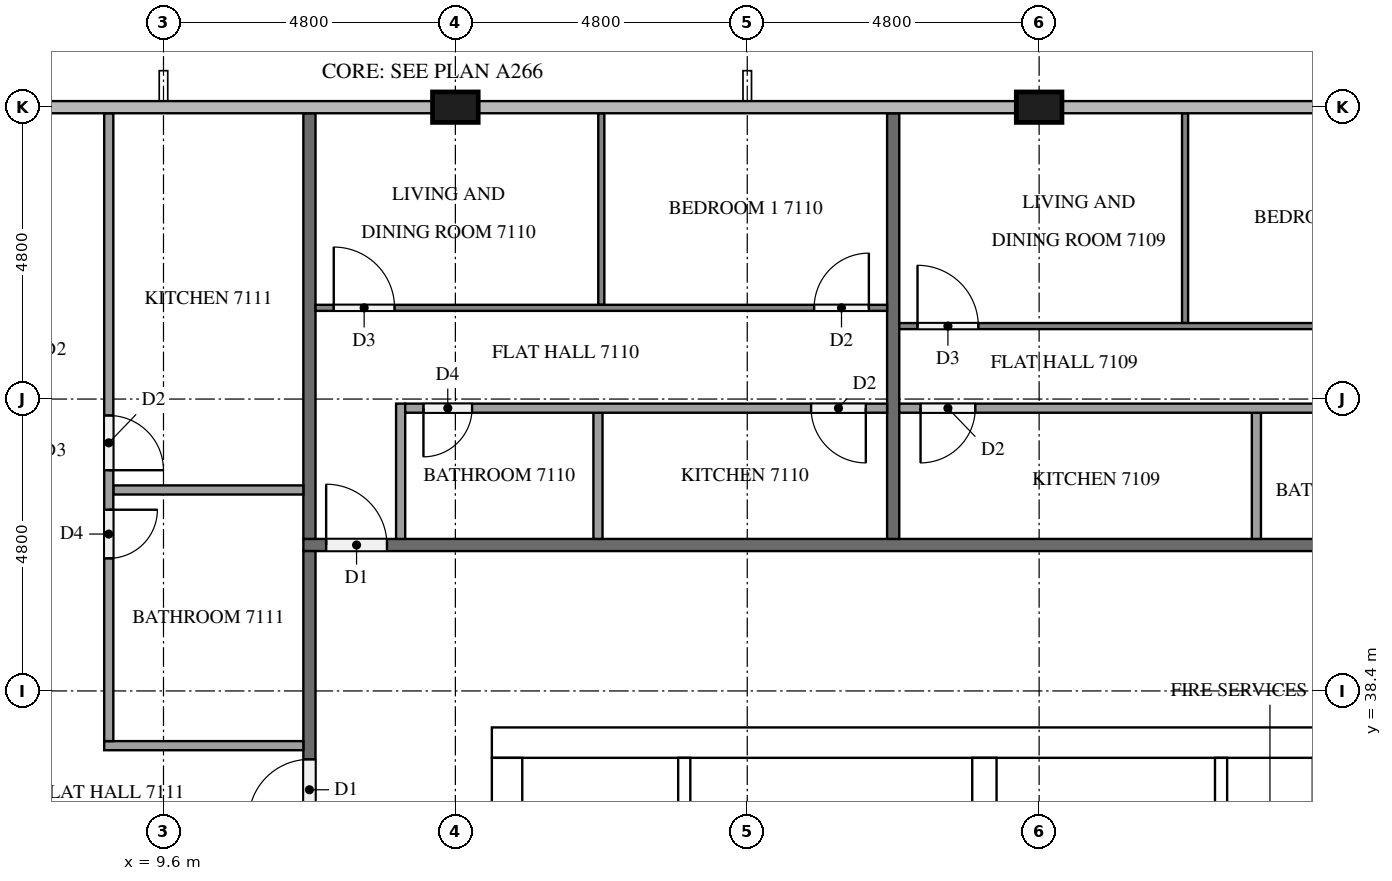
"""IFC4 building model, lengths in metres.
Left out: names, types, materials, properties, quantities, classifications, styles, units other than length and angle.
Written with IfcOpenShell. Run it as: python <this file> out.ifc"""

import sys

from ifc_helpers import new_model, si_unit, direction, frame, frame_2d, origin, origin_2d, place, context, subcontext, project, spatial, rectangle, extrude, element, fill, save


model = new_model("IFC4")
c1 = context("Model", 3, precision=1e-05, world=origin(), true_north=direction((0.0, 1.0)))
c2 = subcontext(c1, "Body", "Model", "MODEL_VIEW")
j1 = project(units=[si_unit("LENGTHUNIT", "METRE"), si_unit("PLANEANGLEUNIT", "RADIAN")], contexts=[c1])
p1 = place(None, origin())
s1 = spatial("IfcSite", under=j1, at=p1, CompositionType="ELEMENT")
p2 = place(p1, origin())
s2 = spatial("IfcBuilding", under=s1, at=p2, CompositionType="ELEMENT")
p3 = place(p2, frame((0.0, 0.0, 272.1)))
s3 = spatial("IfcBuildingStorey", under=s2, at=p3, CompositionType="ELEMENT", Elevation=272.1)
p4 = place(p3, frame((15.0, 37.55, 0.0), z_axis=(0.0, 0.0, 1.0), x_axis=(1.0, 0.0, 0.0)))
e1 = element("IfcWall", 1, at=p4, inside=s3, PredefinedType="SHEAR", context=c2, shape_type="SweptSolid", body=[
    extrude(rectangle(XDim=32.4, YDim=0.5, at=frame_2d((16.2, 0.0))), origin(), (0.0, 0.0, 1.0), 3.2),
])
p5 = place(p4, frame((15.3, 0.0, 0.0)))
e2 = element("IfcOpeningElement", 2, at=p5, cuts=e1, PredefinedType="OPENING", context=c2, shape_type="SweptSolid", body=[
    extrude(rectangle(XDim=1.8, YDim=2.1, at=frame_2d((0.9, 1.05))), frame((0.0, 0.26, 0.0), z_axis=(0.0, -1.0, 0.0), x_axis=(1.0, 0.0, 0.0)), (0.0, 0.0, 1.0), 0.52),
])
p6 = place(p4, frame((1.282, 0.0, 0.0)))
e3 = element("IfcOpeningElement", 3, at=p6, cuts=e1, PredefinedType="OPENING", context=c2, shape_type="SweptSolid", body=[
    extrude(rectangle(XDim=1.0, YDim=2.1, at=frame_2d((0.5, 1.05))), frame((0.0, 0.26, 0.0), z_axis=(0.0, -1.0, 0.0), x_axis=(1.0, 0.0, 0.0)), (0.0, 0.0, 1.0), 0.52),
])
p7 = place(p4, frame((5.082, 0.0, 0.0)))
e4 = element("IfcOpeningElement", 4, at=p7, cuts=e1, PredefinedType="OPENING", context=c2, shape_type="SweptSolid", body=[
    extrude(rectangle(XDim=1.0, YDim=2.1, at=frame_2d((0.5, 1.05))), frame((0.0, 0.26, 0.0), z_axis=(0.0, -1.0, 0.0), x_axis=(1.0, 0.0, 0.0)), (0.0, 0.0, 1.0), 0.52),
])
p8 = place(p3, frame((15.25, 15.5, 0.0), z_axis=(0.0, 0.0, 1.0), x_axis=(0.0, 1.0, 0.0)))
e5 = element("IfcWall", 5, at=p8, inside=s3, PredefinedType="SHEAR", context=c2, shape_type="SweptSolid", body=[
    extrude(rectangle(XDim=21.8, YDim=0.5, at=frame_2d((10.9, 0.0))), origin(), (0.0, 0.0, 1.0), 3.2),
])
p9 = place(p8, frame((5.26, 0.0, 0.0)))
e6 = element("IfcOpeningElement", 6, at=p9, cuts=e5, PredefinedType="OPENING", context=c2, shape_type="SweptSolid", body=[
    extrude(rectangle(XDim=1.2, YDim=2.1, at=frame_2d((0.6, 1.05))), frame((0.0, 0.26, 0.0), z_axis=(0.0, -1.0, 0.0), x_axis=(1.0, 0.0, 0.0)), (0.0, 0.0, 1.0), 0.52),
])
p10 = place(p3, frame((23.1, 15.5, 0.0), z_axis=(0.0, 0.0, 1.0), x_axis=(0.0, 1.0, 0.0)))
e7 = element("IfcWall", 7, at=p10, inside=s3, PredefinedType="SHEAR", context=c2, shape_type="SweptSolid", body=[
    extrude(rectangle(XDim=21.8, YDim=0.4, at=frame_2d((10.9, 0.0))), origin(), (0.0, 0.0, 1.0), 3.2),
])
for number, where, z_axis, x_axis in (
    (8, (24.0, 48.0, 0.0), (0.0, 0.0, 1.0), (1.0, 0.0, 0.0)),
    (9, (14.4, 48.0, 0.0), (0.0, 0.0, 1.0), (1.0, 0.0, 0.0)),
):
    element("IfcColumn", number, at=place(p3, frame(where, z_axis=z_axis, x_axis=x_axis)), inside=s3, PredefinedType="COLUMN", context=c2, shape_type="SweptSolid", body=[
        extrude(rectangle(XDim=0.75, YDim=0.5, at=origin_2d()), origin(), (0.0, 0.0, 1.0), 3.2),
    ])
p11 = place(p3, frame((18.164, 31.45, 0.0), z_axis=(0.0, 0.0, 1.0), x_axis=(0.0, 1.0, 0.0)))
e10 = element("IfcWall", 10, at=p11, inside=s3, PredefinedType="PARTITIONING", context=c2, shape_type="SweptSolid", body=[
    extrude(rectangle(XDim=5.85, YDim=0.2, at=frame_2d((2.925, 0.0))), origin(), (0.0, 0.0, 1.0), 3.2),
])
p12 = place(p3, frame((26.992, 33.75, 0.0), z_axis=(0.0, 0.0, 1.0), x_axis=(0.0, 1.0, 0.0)))
e11 = element("IfcWall", 11, at=p12, inside=s3, PredefinedType="PARTITIONING", context=c2, shape_type="SweptSolid", body=[
    extrude(rectangle(XDim=3.55, YDim=0.2, at=frame_2d((1.775, 0.0))), origin(), (0.0, 0.0, 1.0), 3.2),
])
p13 = place(p3, frame((11.9, 40.8, 0.0), z_axis=(0.0, 0.0, 1.0), x_axis=(1.0, 0.0, 0.0)))
e12 = element("IfcWall", 12, at=p13, inside=s3, PredefinedType="PARTITIONING", context=c2, shape_type="SweptSolid", body=[
    extrude(rectangle(XDim=38.6, YDim=0.2, at=frame_2d((19.3, 0.0))), origin(), (0.0, 0.0, 1.0), 3.2),
])
p14 = place(p13, frame((31.575, 0.0, 0.0)))
e13 = element("IfcOpeningElement", 13, at=p14, cuts=e12, PredefinedType="OPENING", context=c2, shape_type="SweptSolid", body=[
    extrude(rectangle(XDim=1.0, YDim=2.1, at=frame_2d((0.5, 1.05))), frame((0.0, 0.11, 0.0), z_axis=(0.0, -1.0, 0.0), x_axis=(1.0, 0.0, 0.0)), (0.0, 0.0, 1.0), 0.22),
])
p15 = place(p13, frame((24.375, 0.0, 0.0)))
e14 = element("IfcOpeningElement", 14, at=p15, cuts=e12, PredefinedType="OPENING", context=c2, shape_type="SweptSolid", body=[
    extrude(rectangle(XDim=1.0, YDim=2.1, at=frame_2d((0.5, 1.05))), frame((0.0, 0.11, 0.0), z_axis=(0.0, -1.0, 0.0), x_axis=(1.0, 0.0, 0.0)), (0.0, 0.0, 1.0), 0.22),
])
p16 = place(p13, frame((22.825, 0.0, 0.0)))
e15 = element("IfcOpeningElement", 15, at=p16, cuts=e12, PredefinedType="OPENING", context=c2, shape_type="SweptSolid", body=[
    extrude(rectangle(XDim=1.0, YDim=2.1, at=frame_2d((0.5, 1.05))), frame((0.0, 0.11, 0.0), z_axis=(0.0, -1.0, 0.0), x_axis=(1.0, 0.0, 0.0)), (0.0, 0.0, 1.0), 0.22),
])
p17 = place(p13, frame((0.375, 0.0, 0.0)))
e16 = element("IfcOpeningElement", 16, at=p17, cuts=e12, PredefinedType="OPENING", context=c2, shape_type="SweptSolid", body=[
    extrude(rectangle(XDim=1.0, YDim=2.1, at=frame_2d((0.5, 1.05))), frame((0.0, 0.11, 0.0), z_axis=(0.0, -1.0, 0.0), x_axis=(1.0, 0.0, 0.0)), (0.0, 0.0, 1.0), 0.22),
])
p18 = place(p3, frame((12.0, 12.1, 0.0), z_axis=(0.0, 0.0, 1.0), x_axis=(0.0, 1.0, 0.0)))
e17 = element("IfcWall", 17, at=p18, inside=s3, PredefinedType="PARTITIONING", context=c2, shape_type="SweptSolid", body=[
    extrude(rectangle(XDim=28.6, YDim=0.2, at=frame_2d((14.3, 0.0))), origin(), (0.0, 0.0, 1.0), 3.2),
])
p19 = place(p18, frame((24.175, 0.0, 0.0)))
e18 = element("IfcOpeningElement", 18, at=p19, cuts=e17, PredefinedType="OPENING", context=c2, shape_type="SweptSolid", body=[
    extrude(rectangle(XDim=1.0, YDim=2.1, at=frame_2d((0.5, 1.05))), frame((0.0, 0.11, 0.0), z_axis=(0.0, -1.0, 0.0), x_axis=(1.0, 0.0, 0.0)), (0.0, 0.0, 1.0), 0.22),
])
p20 = place(p18, frame((14.575, 0.0, 0.0)))
e19 = element("IfcOpeningElement", 19, at=p20, cuts=e17, PredefinedType="OPENING", context=c2, shape_type="SweptSolid", body=[
    extrude(rectangle(XDim=1.0, YDim=2.1, at=frame_2d((0.5, 1.05))), frame((0.0, 0.11, 0.0), z_axis=(0.0, -1.0, 0.0), x_axis=(1.0, 0.0, 0.0)), (0.0, 0.0, 1.0), 0.22),
])
p21 = place(p18, frame((0.175, 0.0, 0.0)))
e20 = element("IfcOpeningElement", 20, at=p21, cuts=e17, PredefinedType="OPENING", context=c2, shape_type="SweptSolid", body=[
    extrude(rectangle(XDim=1.0, YDim=2.1, at=frame_2d((0.5, 1.05))), frame((0.0, 0.11, 0.0), z_axis=(0.0, -1.0, 0.0), x_axis=(1.0, 0.0, 0.0)), (0.0, 0.0, 1.0), 0.22),
])
for number, where, z_axis, x_axis in (
    (21, (21.6, 47.9, 0.0), (0.0, 0.0, 1.0), (0.0, -1.0, 0.0)),
    (22, (12.0, 47.9, 0.0), (0.0, 0.0, 1.0), (0.0, -1.0, 0.0)),
):
    element("IfcWall", number, at=place(p3, frame(where, z_axis=z_axis, x_axis=x_axis)), inside=s3, PredefinedType="PARTITIONING", context=c2, shape_type="SweptSolid", body=[
        extrude(rectangle(XDim=7.0, YDim=0.2, at=frame_2d((3.5, 0.0))), origin(), (0.0, 0.0, 1.0), 3.2),
    ])
p22 = place(p3, frame((26.4, 44.45, 0.0), z_axis=(0.0, 0.0, 1.0), x_axis=(0.0, 1.0, 0.0)))
e23 = element("IfcWall", 23, at=p22, inside=s3, PredefinedType="PARTITIONING", context=c2, shape_type="SweptSolid", body=[
    extrude(rectangle(XDim=3.45, YDim=0.1, at=frame_2d((1.725, 0.0))), origin(), (0.0, 0.0, 1.0), 3.2),
])
p23 = place(p3, frame((21.7, 44.4, 0.0), z_axis=(0.0, 0.0, 1.0), x_axis=(1.0, 0.0, 0.0)))
e24 = element("IfcWall", 24, at=p23, inside=s3, PredefinedType="PARTITIONING", context=c2, shape_type="SweptSolid", body=[
    extrude(rectangle(XDim=14.2, YDim=0.1, at=frame_2d((7.1, 0.0))), origin(), (0.0, 0.0, 1.0), 3.2),
])
p24 = place(p23, frame((9.85, 0.0, 0.0)))
e25 = element("IfcOpeningElement", 25, at=p24, cuts=e24, PredefinedType="OPENING", context=c2, shape_type="SweptSolid", body=[
    extrude(rectangle(XDim=0.9, YDim=2.1, at=frame_2d((0.45, 1.05))), frame((0.0, 0.06, 0.0), z_axis=(0.0, -1.0, 0.0), x_axis=(1.0, 0.0, 0.0)), (0.0, 0.0, 1.0), 0.12),
])
p25 = place(p23, frame((8.25, 0.0, 0.0)))
e26 = element("IfcOpeningElement", 26, at=p25, cuts=e24, PredefinedType="OPENING", context=c2, shape_type="SweptSolid", body=[
    extrude(rectangle(XDim=0.9, YDim=2.1, at=frame_2d((0.45, 1.05))), frame((0.0, 0.06, 0.0), z_axis=(0.0, -1.0, 0.0), x_axis=(1.0, 0.0, 0.0)), (0.0, 0.0, 1.0), 0.12),
])
p26 = place(p23, frame((0.3, 0.0, 0.0)))
e27 = element("IfcOpeningElement", 27, at=p26, cuts=e24, PredefinedType="OPENING", context=c2, shape_type="SweptSolid", body=[
    extrude(rectangle(XDim=1.0, YDim=2.1, at=frame_2d((0.5, 1.05))), frame((0.0, 0.06, 0.0), z_axis=(0.0, -1.0, 0.0), x_axis=(1.0, 0.0, 0.0)), (0.0, 0.0, 1.0), 0.12),
])
p27 = place(p3, frame((27.573, 40.9, 0.0), z_axis=(0.0, 0.0, 1.0), x_axis=(0.0, 1.0, 0.0)))
e28 = element("IfcWall", 28, at=p27, inside=s3, PredefinedType="PARTITIONING", context=c2, shape_type="SweptSolid", body=[
    extrude(rectangle(XDim=2.075, YDim=0.15, at=frame_2d((1.038, 0.0))), origin(), (0.0, 0.0, 1.0), 3.2),
])
p28 = place(p3, frame((34.425, 43.05, 0.0), z_axis=(0.0, 0.0, 1.0), x_axis=(-1.0, 0.0, 0.0)))
e29 = element("IfcWall", 29, at=p28, inside=s3, PredefinedType="PARTITIONING", context=c2, shape_type="SweptSolid", body=[
    extrude(rectangle(XDim=12.725, YDim=0.15, at=frame_2d((6.363, 0.0))), origin(), (0.0, 0.0, 1.0), 3.2),
])
p29 = place(p28, frame((1.812, 0.0, 0.0)))
e30 = element("IfcOpeningElement", 30, at=p29, cuts=e29, PredefinedType="OPENING", context=c2, shape_type="SweptSolid", body=[
    extrude(rectangle(XDim=0.8, YDim=2.1, at=frame_2d((0.4, 1.05))), frame((0.0, 0.085, 0.0), z_axis=(0.0, -1.0, 0.0), x_axis=(1.0, 0.0, 0.0)), (0.0, 0.0, 1.0), 0.17),
])
p30 = place(p28, frame((3.261, 0.0, 0.0)))
e31 = element("IfcOpeningElement", 31, at=p30, cuts=e29, PredefinedType="OPENING", context=c2, shape_type="SweptSolid", body=[
    extrude(rectangle(XDim=0.9, YDim=2.1, at=frame_2d((0.45, 1.05))), frame((0.0, 0.085, 0.0), z_axis=(0.0, -1.0, 0.0), x_axis=(1.0, 0.0, 0.0)), (0.0, 0.0, 1.0), 0.17),
])
p31 = place(p28, frame((11.475, 0.0, 0.0)))
e32 = element("IfcOpeningElement", 32, at=p31, cuts=e29, PredefinedType="OPENING", context=c2, shape_type="SweptSolid", body=[
    extrude(rectangle(XDim=0.9, YDim=2.1, at=frame_2d((0.45, 1.05))), frame((0.0, 0.085, 0.0), z_axis=(0.0, -1.0, 0.0), x_axis=(1.0, 0.0, 0.0)), (0.0, 0.0, 1.0), 0.17),
])
p32 = place(p3, frame((16.8, 44.75, 0.0), z_axis=(0.0, 0.0, 1.0), x_axis=(0.0, 1.0, 0.0)))
e33 = element("IfcWall", 33, at=p32, inside=s3, PredefinedType="PARTITIONING", context=c2, shape_type="SweptSolid", body=[
    extrude(rectangle(XDim=3.15, YDim=0.1, at=frame_2d((1.575, 0.0))), origin(), (0.0, 0.0, 1.0), 3.2),
])
p33 = place(p3, frame((12.1, 44.7, 0.0), z_axis=(0.0, 0.0, 1.0), x_axis=(1.0, 0.0, 0.0)))
e34 = element("IfcWall", 34, at=p33, inside=s3, PredefinedType="PARTITIONING", context=c2, shape_type="SweptSolid", body=[
    extrude(rectangle(XDim=9.4, YDim=0.1, at=frame_2d((4.7, 0.0))), origin(), (0.0, 0.0, 1.0), 3.2),
])
p34 = place(p33, frame((0.3, 0.0, 0.0)))
e35 = element("IfcOpeningElement", 35, at=p34, cuts=e34, PredefinedType="OPENING", context=c2, shape_type="SweptSolid", body=[
    extrude(rectangle(XDim=1.0, YDim=2.1, at=frame_2d((0.5, 1.05))), frame((0.0, 0.06, 0.0), z_axis=(0.0, -1.0, 0.0), x_axis=(1.0, 0.0, 0.0)), (0.0, 0.0, 1.0), 0.12),
])
p35 = place(p33, frame((8.2, 0.0, 0.0)))
e36 = element("IfcOpeningElement", 36, at=p35, cuts=e34, PredefinedType="OPENING", context=c2, shape_type="SweptSolid", body=[
    extrude(rectangle(XDim=0.9, YDim=2.1, at=frame_2d((0.45, 1.05))), frame((0.0, 0.06, 0.0), z_axis=(0.0, -1.0, 0.0), x_axis=(1.0, 0.0, 0.0)), (0.0, 0.0, 1.0), 0.12),
])
p36 = place(p3, frame((16.745, 40.9, 0.0), z_axis=(0.0, 0.0, 1.0), x_axis=(0.0, 1.0, 0.0)))
e37 = element("IfcWall", 37, at=p36, inside=s3, PredefinedType="PARTITIONING", context=c2, shape_type="SweptSolid", body=[
    extrude(rectangle(XDim=2.075, YDim=0.15, at=frame_2d((1.038, 0.0))), origin(), (0.0, 0.0, 1.0), 3.2),
])
p37 = place(p3, frame((13.5, 40.9, 0.0), z_axis=(0.0, 0.0, 1.0), x_axis=(0.0, 1.0, 0.0)))
e38 = element("IfcWall", 38, at=p37, inside=s3, PredefinedType="PARTITIONING", context=c2, shape_type="SweptSolid", body=[
    extrude(rectangle(XDim=2.225, YDim=0.15, at=frame_2d((1.113, 0.0))), origin(), (0.0, 0.0, 1.0), 3.2),
])
p38 = place(p3, frame((21.5, 43.05, 0.0), z_axis=(0.0, 0.0, 1.0), x_axis=(-1.0, 0.0, 0.0)))
e39 = element("IfcWall", 39, at=p38, inside=s3, PredefinedType="PARTITIONING", context=c2, shape_type="SweptSolid", body=[
    extrude(rectangle(XDim=7.925, YDim=0.15, at=frame_2d((3.962, 0.0))), origin(), (0.0, 0.0, 1.0), 3.2),
])
p39 = place(p38, frame((6.825, 0.0, 0.0)))
e40 = element("IfcOpeningElement", 40, at=p39, cuts=e39, PredefinedType="OPENING", context=c2, shape_type="SweptSolid", body=[
    extrude(rectangle(XDim=0.8, YDim=2.1, at=frame_2d((0.4, 1.05))), frame((0.0, 0.085, 0.0), z_axis=(0.0, -1.0, 0.0), x_axis=(1.0, 0.0, 0.0)), (0.0, 0.0, 1.0), 0.17),
])
p40 = place(p38, frame((0.35, 0.0, 0.0)))
e41 = element("IfcOpeningElement", 41, at=p40, cuts=e39, PredefinedType="OPENING", context=c2, shape_type="SweptSolid", body=[
    extrude(rectangle(XDim=0.9, YDim=2.1, at=frame_2d((0.45, 1.05))), frame((0.0, 0.085, 0.0), z_axis=(0.0, -1.0, 0.0), x_axis=(1.0, 0.0, 0.0)), (0.0, 0.0, 1.0), 0.17),
])
p41 = place(p3, frame((11.9, 41.705, 0.0), z_axis=(0.0, 0.0, 1.0), x_axis=(-1.0, 0.0, 0.0)))
e42 = element("IfcWall", 42, at=p41, inside=s3, PredefinedType="PARTITIONING", context=c2, shape_type="SweptSolid", body=[
    extrude(rectangle(XDim=3.125, YDim=0.15, at=frame_2d((1.562, 0.0))), origin(), (0.0, 0.0, 1.0), 3.2),
])
p42 = place(p3, frame((11.9, 37.5, 0.0), z_axis=(0.0, 0.0, 1.0), x_axis=(-1.0, 0.0, 0.0)))
e43 = element("IfcWall", 43, at=p42, inside=s3, PredefinedType="PARTITIONING", context=c2, shape_type="SweptSolid", body=[
    extrude(rectangle(XDim=3.275, YDim=0.15, at=frame_2d((1.637, 0.0))), origin(), (0.0, 0.0, 1.0), 3.2),
])
p43 = place(p3, frame((8.7, 47.9, 0.0), z_axis=(0.0, 0.0, 1.0), x_axis=(0.0, -1.0, 0.0)))
e44 = element("IfcWall", 44, at=p43, inside=s3, PredefinedType="PARTITIONING", context=c2, shape_type="SweptSolid", body=[
    extrude(rectangle(XDim=10.325, YDim=0.15, at=frame_2d((5.163, 0.0))), origin(), (0.0, 0.0, 1.0), 3.2),
])
p44 = place(p43, frame((6.52, 0.0, 0.0)))
e45 = element("IfcOpeningElement", 45, at=p44, cuts=e44, PredefinedType="OPENING", context=c2, shape_type="SweptSolid", body=[
    extrude(rectangle(XDim=0.8, YDim=2.1, at=frame_2d((0.4, 1.05))), frame((0.0, 0.085, 0.0), z_axis=(0.0, -1.0, 0.0), x_axis=(1.0, 0.0, 0.0)), (0.0, 0.0, 1.0), 0.17),
])
p45 = place(p43, frame((4.97, 0.0, 0.0)))
e46 = element("IfcOpeningElement", 46, at=p45, cuts=e44, PredefinedType="OPENING", context=c2, shape_type="SweptSolid", body=[
    extrude(rectangle(XDim=0.9, YDim=2.1, at=frame_2d((0.45, 1.05))), frame((0.0, 0.085, 0.0), z_axis=(0.0, -1.0, 0.0), x_axis=(1.0, 0.0, 0.0)), (0.0, 0.0, 1.0), 0.17),
])
p46 = place(p6, origin())
e47 = element("IfcDoor", 47, at=p46, inside=s3, OperationType="SINGLE_SWING_RIGHT", PredefinedType="DOOR", context=c2, shape_type="SweptSolid", body=[
    extrude(rectangle(XDim=1.0, YDim=2.1, at=frame_2d((0.5, 1.05))), frame((0.0, 0.025, 0.0), z_axis=(0.0, -1.0, 0.0), x_axis=(1.0, 0.0, 0.0)), (0.0, 0.0, 1.0), 0.05),
])
fill(e3, e47)
p47 = place(p7, origin())
e48 = element("IfcDoor", 48, at=p47, inside=s3, OperationType="SINGLE_SWING_LEFT", PredefinedType="DOOR", context=c2, shape_type="SweptSolid", body=[
    extrude(rectangle(XDim=1.0, YDim=2.1, at=frame_2d((0.5, 1.05))), frame((0.0, 0.025, 0.0), z_axis=(0.0, -1.0, 0.0), x_axis=(1.0, 0.0, 0.0)), (0.0, 0.0, 1.0), 0.05),
])
fill(e4, e48)
p48 = place(p17, origin())
e49 = element("IfcDoor", 49, at=p48, inside=s3, OperationType="SINGLE_SWING_LEFT", PredefinedType="DOOR", context=c2, shape_type="SweptSolid", body=[
    extrude(rectangle(XDim=1.0, YDim=2.1, at=frame_2d((0.5, 1.05))), frame((0.0, 0.025, 0.0), z_axis=(0.0, -1.0, 0.0), x_axis=(1.0, 0.0, 0.0)), (0.0, 0.0, 1.0), 0.05),
])
fill(e16, e49)
p49 = place(p19, origin())
e50 = element("IfcDoor", 50, at=p49, inside=s3, OperationType="SINGLE_SWING_LEFT", PredefinedType="DOOR", context=c2, shape_type="SweptSolid", body=[
    extrude(rectangle(XDim=1.0, YDim=2.1, at=frame_2d((0.5, 1.05))), frame((0.0, 0.025, 0.0), z_axis=(0.0, -1.0, 0.0), x_axis=(1.0, 0.0, 0.0)), (0.0, 0.0, 1.0), 0.05),
])
fill(e18, e50)
p50 = place(p26, origin())
e51 = element("IfcDoor", 51, at=p50, inside=s3, OperationType="SINGLE_SWING_LEFT", PredefinedType="DOOR", context=c2, shape_type="SweptSolid", body=[
    extrude(rectangle(XDim=1.0, YDim=2.1, at=frame_2d((0.5, 1.05))), frame((0.0, 0.025, 0.0), z_axis=(0.0, -1.0, 0.0), x_axis=(1.0, 0.0, 0.0)), (0.0, 0.0, 1.0), 0.05),
])
fill(e27, e51)
p51 = place(p31, origin())
e52 = element("IfcDoor", 52, at=p51, inside=s3, OperationType="SINGLE_SWING_RIGHT", PredefinedType="DOOR", context=c2, shape_type="SweptSolid", body=[
    extrude(rectangle(XDim=0.9, YDim=2.1, at=frame_2d((0.45, 1.05))), frame((0.0, 0.025, 0.0), z_axis=(0.0, -1.0, 0.0), x_axis=(1.0, 0.0, 0.0)), (0.0, 0.0, 1.0), 0.05),
])
fill(e32, e52)
p52 = place(p34, origin())
e53 = element("IfcDoor", 53, at=p52, inside=s3, OperationType="SINGLE_SWING_LEFT", PredefinedType="DOOR", context=c2, shape_type="SweptSolid", body=[
    extrude(rectangle(XDim=1.0, YDim=2.1, at=frame_2d((0.5, 1.05))), frame((0.0, 0.025, 0.0), z_axis=(0.0, -1.0, 0.0), x_axis=(1.0, 0.0, 0.0)), (0.0, 0.0, 1.0), 0.05),
])
fill(e35, e53)
p53 = place(p35, origin())
e54 = element("IfcDoor", 54, at=p53, inside=s3, OperationType="SINGLE_SWING_RIGHT", PredefinedType="DOOR", context=c2, shape_type="SweptSolid", body=[
    extrude(rectangle(XDim=0.9, YDim=2.1, at=frame_2d((0.45, 1.05))), frame((0.0, 0.025, 0.0), z_axis=(0.0, -1.0, 0.0), x_axis=(1.0, 0.0, 0.0)), (0.0, 0.0, 1.0), 0.05),
])
fill(e36, e54)
p54 = place(p39, origin())
e55 = element("IfcDoor", 55, at=p54, inside=s3, OperationType="SINGLE_SWING_RIGHT", PredefinedType="DOOR", context=c2, shape_type="SweptSolid", body=[
    extrude(rectangle(XDim=0.8, YDim=2.1, at=frame_2d((0.4, 1.05))), frame((0.0, 0.025, 0.0), z_axis=(0.0, -1.0, 0.0), x_axis=(1.0, 0.0, 0.0)), (0.0, 0.0, 1.0), 0.05),
])
fill(e40, e55)
p55 = place(p40, origin())
e56 = element("IfcDoor", 56, at=p55, inside=s3, OperationType="SINGLE_SWING_LEFT", PredefinedType="DOOR", context=c2, shape_type="SweptSolid", body=[
    extrude(rectangle(XDim=0.9, YDim=2.1, at=frame_2d((0.45, 1.05))), frame((0.0, 0.025, 0.0), z_axis=(0.0, -1.0, 0.0), x_axis=(1.0, 0.0, 0.0)), (0.0, 0.0, 1.0), 0.05),
])
fill(e41, e56)
p56 = place(p44, origin())
e57 = element("IfcDoor", 57, at=p56, inside=s3, OperationType="SINGLE_SWING_LEFT", PredefinedType="DOOR", context=c2, shape_type="SweptSolid", body=[
    extrude(rectangle(XDim=0.8, YDim=2.1, at=frame_2d((0.4, 1.05))), frame((0.0, 0.025, 0.0), z_axis=(0.0, -1.0, 0.0), x_axis=(1.0, 0.0, 0.0)), (0.0, 0.0, 1.0), 0.05),
])
fill(e45, e57)
p57 = place(p45, origin())
e58 = element("IfcDoor", 58, at=p57, inside=s3, OperationType="SINGLE_SWING_RIGHT", PredefinedType="DOOR", context=c2, shape_type="SweptSolid", body=[
    extrude(rectangle(XDim=0.9, YDim=2.1, at=frame_2d((0.45, 1.05))), frame((0.0, 0.025, 0.0), z_axis=(0.0, -1.0, 0.0), x_axis=(1.0, 0.0, 0.0)), (0.0, 0.0, 1.0), 0.05),
])
fill(e46, e58)
save(model, sys.argv[1])
